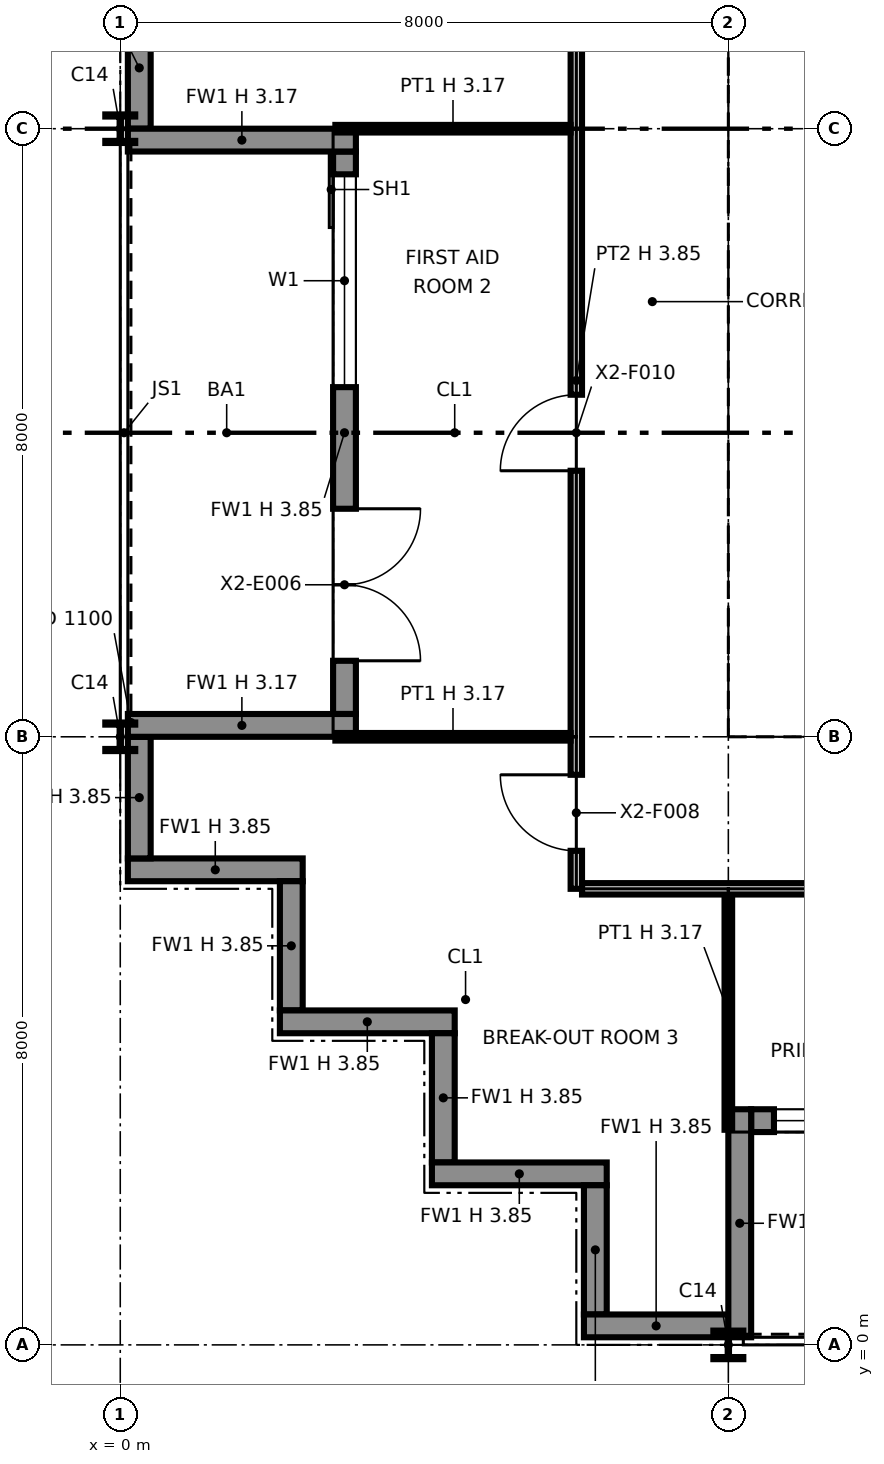
"""IFC4 building model, lengths in metres.
Left out: names, types, materials, properties, quantities, classifications, styles, units other than length and angle.
Written with IfcOpenShell. Run it as: python <this file> out.ifc"""

import sys

from ifc_helpers import new_model, si_unit, direction, frame, frame_2d, origin, origin_2d, place, context, subcontext, project, spatial, polyline, rectangle, i_section, outline, extrude, element, fill, save


model = new_model("IFC4")
c1 = context("Model", 3, precision=1e-05, world=origin(), true_north=direction((0.0, 1.0)))
c2 = subcontext(c1, "Body", "Model", "MODEL_VIEW")
j1 = project(units=[si_unit("LENGTHUNIT", "METRE"), si_unit("PLANEANGLEUNIT", "RADIAN")], contexts=[c1])
p1 = place(None, origin())
s1 = spatial("IfcSite", under=j1, at=p1, CompositionType="ELEMENT")
p2 = place(p1, origin())
s2 = spatial("IfcBuilding", under=s1, at=p2, CompositionType="ELEMENT")
p3 = place(p2, frame((0.0, 0.0, 263.0)))
s3 = spatial("IfcBuildingStorey", under=s2, at=p3, CompositionType="ELEMENT", Elevation=263.0)
for number, where, z_axis, x_axis in (
    (1, (0.0, 8.0, 0.0), (0.0, 0.0, 1.0), (1.0, 0.0, 0.0)),
    (2, (0.0, 16.0, 0.0), (0.0, 0.0, 1.0), (1.0, 0.0, 0.0)),
    (3, (8.0, 0.0, 0.0), (0.0, 0.0, 1.0), (1.0, 0.0, 0.0)),
):
    element("IfcColumn", number, at=place(p3, frame(where, z_axis=z_axis, x_axis=x_axis)), inside=s3, PredefinedType="COLUMN", context=c2, shape_type="SweptSolid", body=[
        extrude(i_section(OverallWidth=0.394, OverallDepth=0.376, WebThickness=0.017, FlangeThickness=0.028, at=origin_2d()), origin(), (0.0, 0.0, 1.0), 3.85),
    ])
for number, where, z_axis, x_axis in (
    (4, (8.0, 8.0, 0.0), (0.0, 0.0, 1.0), (1.0, 0.0, 0.0)),
    (5, (8.0, 16.0, 0.0), (0.0, 0.0, 1.0), (1.0, 0.0, 0.0)),
):
    element("IfcColumn", number, at=place(p3, frame(where, z_axis=z_axis, x_axis=x_axis)), inside=s3, PredefinedType="COLUMN", context=c2, shape_type="SweptSolid", body=[
        extrude(i_section(OverallWidth=0.371, OverallDepth=0.361, WebThickness=0.012, FlangeThickness=0.02, at=origin_2d()), origin(), (0.0, 0.0, 1.0), 3.85),
    ])
p4 = place(p3, frame((0.1, 6.25, 0.0), z_axis=(0.0, 0.0, 1.0), x_axis=(1.0, 0.0, 0.0)))
e6 = element("IfcWall", 6, at=p4, inside=s3, PredefinedType="SOLIDWALL", context=c2, shape_type="SweptSolid", body=[
    extrude(rectangle(XDim=2.3, YDim=0.3, at=frame_2d((1.15, 0.0))), origin(), (0.0, 0.0, 1.0), 3.85),
])
p5 = place(p3, frame((2.25, 6.1, 0.0), z_axis=(0.0, 0.0, 1.0), x_axis=(0.0, -1.0, 0.0)))
e7 = element("IfcWall", 7, at=p5, inside=s3, PredefinedType="SOLIDWALL", context=c2, shape_type="SweptSolid", body=[
    extrude(rectangle(XDim=1.7, YDim=0.3, at=frame_2d((0.85, 0.0))), origin(), (0.0, 0.0, 1.0), 3.85),
])
p6 = place(p3, frame((2.1, 4.25, 0.0), z_axis=(0.0, 0.0, 1.0), x_axis=(1.0, 0.0, 0.0)))
e8 = element("IfcWall", 8, at=p6, inside=s3, PredefinedType="SOLIDWALL", context=c2, shape_type="SweptSolid", body=[
    extrude(rectangle(XDim=2.3, YDim=0.3, at=frame_2d((1.15, 0.0))), origin(), (0.0, 0.0, 1.0), 3.85),
])
p7 = place(p3, frame((4.25, 4.1, 0.0), z_axis=(0.0, 0.0, 1.0), x_axis=(0.0, -1.0, 0.0)))
e9 = element("IfcWall", 9, at=p7, inside=s3, PredefinedType="SOLIDWALL", context=c2, shape_type="SweptSolid", body=[
    extrude(rectangle(XDim=1.7, YDim=0.3, at=frame_2d((0.85, 0.0))), origin(), (0.0, 0.0, 1.0), 3.85),
])
p8 = place(p3, frame((4.1, 2.25, 0.0), z_axis=(0.0, 0.0, 1.0), x_axis=(1.0, 0.0, 0.0)))
e10 = element("IfcWall", 10, at=p8, inside=s3, PredefinedType="SOLIDWALL", context=c2, shape_type="SweptSolid", body=[
    extrude(rectangle(XDim=2.3, YDim=0.3, at=frame_2d((1.15, 0.0))), origin(), (0.0, 0.0, 1.0), 3.85),
])
p9 = place(p3, frame((6.25, 2.1, 0.0), z_axis=(0.0, 0.0, 1.0), x_axis=(0.0, -1.0, 0.0)))
e11 = element("IfcWall", 11, at=p9, inside=s3, PredefinedType="SOLIDWALL", context=c2, shape_type="SweptSolid", body=[
    extrude(rectangle(XDim=1.7, YDim=0.3, at=frame_2d((0.85, 0.0))), origin(), (0.0, 0.0, 1.0), 3.85),
])
p10 = place(p3, frame((6.1, 0.25, 0.0), z_axis=(0.0, 0.0, 1.0), x_axis=(1.0, 0.0, 0.0)))
e12 = element("IfcWall", 12, at=p10, inside=s3, PredefinedType="SOLIDWALL", context=c2, shape_type="SweptSolid", body=[
    extrude(rectangle(XDim=1.9, YDim=0.3, at=frame_2d((0.95, 0.0))), origin(), (0.0, 0.0, 1.0), 3.85),
])
p11 = place(p3, frame((8.3, 2.95, 0.0), z_axis=(0.0, 0.0, 1.0), x_axis=(1.0, 0.0, 0.0)))
e13 = element("IfcWall", 13, at=p11, inside=s3, PredefinedType="SOLIDWALL", context=c2, shape_type="SweptSolid", body=[
    extrude(rectangle(XDim=7.4, YDim=0.3, at=frame_2d((3.7, 0.0))), origin(), (0.0, 0.0, 1.0), 3.85),
])
p12 = place(p11, frame((0.3, 0.0, 0.9)))
e14 = element("IfcOpeningElement", 14, at=p12, cuts=e13, PredefinedType="OPENING", context=c2, shape_type="SweptSolid", body=[
    extrude(rectangle(XDim=2.8, YDim=2.2, at=frame_2d((1.4, 1.1))), frame((0.0, 0.16, 0.0), z_axis=(0.0, -1.0, 0.0), x_axis=(1.0, 0.0, 0.0)), (0.0, 0.0, 1.0), 0.32),
])
p13 = place(p11, frame((4.7, 0.0, 0.0)))
e15 = element("IfcOpeningElement", 15, at=p13, cuts=e13, PredefinedType="OPENING", context=c2, shape_type="SweptSolid", body=[
    extrude(rectangle(XDim=2.0, YDim=2.4, at=frame_2d((1.0, 1.2))), frame((0.0, 0.16, 0.0), z_axis=(0.0, -1.0, 0.0), x_axis=(1.0, 0.0, 0.0)), (0.0, 0.0, 1.0), 0.32),
])
p14 = place(p3, frame((8.15, 0.1, 0.0), z_axis=(0.0, 0.0, 1.0), x_axis=(0.0, 1.0, 0.0)))
e16 = element("IfcWall", 16, at=p14, inside=s3, PredefinedType="SOLIDWALL", context=c2, shape_type="SweptSolid", body=[
    extrude(rectangle(XDim=3.0, YDim=0.3, at=frame_2d((1.5, 0.0))), origin(), (0.0, 0.0, 1.0), 3.171),
])
p15 = place(p3, frame((0.25, 17.6, 0.0), z_axis=(0.0, 0.0, 1.0), x_axis=(0.0, -1.0, 0.0)))
e17 = element("IfcWall", 17, at=p15, inside=s3, PredefinedType="SOLIDWALL", context=c2, shape_type="SweptSolid", body=[
    extrude(rectangle(XDim=1.6, YDim=0.3, at=frame_2d((0.8, 0.0))), origin(), (0.0, 0.0, 1.0), 3.85),
])
p16 = place(p3, frame((2.95, 15.7, 0.0), z_axis=(0.0, 0.0, 1.0), x_axis=(0.0, -1.0, 0.0)))
e18 = element("IfcWall", 18, at=p16, inside=s3, PredefinedType="SOLIDWALL", context=c2, shape_type="SweptSolid", body=[
    extrude(rectangle(XDim=7.4, YDim=0.3, at=frame_2d((3.7, 0.0))), origin(), (0.0, 0.0, 1.0), 3.85),
])
p17 = place(p16, frame((0.3, 0.0, 0.9)))
e19 = element("IfcOpeningElement", 19, at=p17, cuts=e18, PredefinedType="OPENING", context=c2, shape_type="SweptSolid", body=[
    extrude(rectangle(XDim=2.8, YDim=2.2, at=frame_2d((1.4, 1.1))), frame((0.0, 0.16, 0.0), z_axis=(0.0, -1.0, 0.0), x_axis=(1.0, 0.0, 0.0)), (0.0, 0.0, 1.0), 0.32),
])
p18 = place(p16, frame((4.7, 0.0, 0.0)))
e20 = element("IfcOpeningElement", 20, at=p18, cuts=e18, PredefinedType="OPENING", context=c2, shape_type="SweptSolid", body=[
    extrude(rectangle(XDim=2.0, YDim=2.4, at=frame_2d((1.0, 1.2))), frame((0.0, 0.16, 0.0), z_axis=(0.0, -1.0, 0.0), x_axis=(1.0, 0.0, 0.0)), (0.0, 0.0, 1.0), 0.32),
])
for number, where, z_axis, x_axis in (
    (21, (0.1, 15.85, 0.0), (0.0, 0.0, 1.0), (1.0, 0.0, 0.0)),
    (22, (0.1, 8.15, 0.0), (0.0, 0.0, 1.0), (1.0, 0.0, 0.0)),
):
    element("IfcWall", number, at=place(p3, frame(where, z_axis=z_axis, x_axis=x_axis)), inside=s3, PredefinedType="SOLIDWALL", context=c2, shape_type="SweptSolid", body=[
        extrude(rectangle(XDim=3.0, YDim=0.3, at=frame_2d((1.5, 0.0))), origin(), (0.0, 0.0, 1.0), 3.171),
    ])
p19 = place(p3, frame((0.25, 8.0, 0.0), z_axis=(0.0, 0.0, 1.0), x_axis=(0.0, -1.0, 0.0)))
e23 = element("IfcWall", 23, at=p19, inside=s3, PredefinedType="SOLIDWALL", context=c2, shape_type="SweptSolid", body=[
    extrude(rectangle(XDim=1.6, YDim=0.3, at=frame_2d((0.8, 0.0))), origin(), (0.0, 0.0, 1.0), 3.85),
])
p20 = place(p3, frame((8.65, 8.75, 0.0), z_axis=(0.0, 0.0, 1.0), x_axis=(1.0, 0.0, 0.0)))
e24 = element("IfcWall", 24, at=p20, inside=s3, PredefinedType="PARTITIONING", context=c2, shape_type="SweptSolid", body=[
    extrude(outline(polyline([(0.0, 0.0), (14.7, 0.0), (14.7, 3.85), (7.438, 3.85), (7.438, 3.308), (7.262, 3.308), (7.261, 3.85), (0.0, 3.85), (0.0, 0.0)])), frame((0.0, 0.1, 0.0), z_axis=(0.0, -1.0, 0.0), x_axis=(1.0, 0.0, 0.0)), (0.0, 0.0, 1.0), 0.2),
])
p21 = place(p20, frame((1.3, 0.0, 0.0)))
e25 = element("IfcOpeningElement", 25, at=p21, cuts=e24, PredefinedType="OPENING", context=c2, shape_type="SweptSolid", body=[
    extrude(rectangle(XDim=1.4, YDim=2.1, at=frame_2d((0.7, 1.05))), frame((0.0, 0.11, 0.0), z_axis=(0.0, -1.0, 0.0), x_axis=(1.0, 0.0, 0.0)), (0.0, 0.0, 1.0), 0.22),
])
p22 = place(p20, frame((4.6, 0.0, 0.0)))
e26 = element("IfcOpeningElement", 26, at=p22, cuts=e24, PredefinedType="OPENING", context=c2, shape_type="SweptSolid", body=[
    extrude(rectangle(XDim=1.4, YDim=2.1, at=frame_2d((0.7, 1.05))), frame((0.0, 0.11, 0.0), z_axis=(0.0, -1.0, 0.0), x_axis=(1.0, 0.0, 0.0)), (0.0, 0.0, 1.0), 0.22),
])
p23 = place(p20, frame((10.4, 0.0, 0.0)))
e27 = element("IfcOpeningElement", 27, at=p23, cuts=e24, PredefinedType="OPENING", context=c2, shape_type="SweptSolid", body=[
    extrude(rectangle(XDim=1.2, YDim=2.1, at=frame_2d((0.6, 1.05))), frame((0.0, 0.11, 0.0), z_axis=(0.0, -1.0, 0.0), x_axis=(1.0, 0.0, 0.0)), (0.0, 0.0, 1.0), 0.22),
])
p24 = place(p3, frame((8.75, 8.85, 0.0), z_axis=(0.0, 0.0, 1.0), x_axis=(0.0, 1.0, 0.0)))
e28 = element("IfcWall", 28, at=p24, inside=s3, PredefinedType="PARTITIONING", context=c2, shape_type="SweptSolid", body=[
    extrude(outline(polyline([(0.0, 0.0), (14.3, 0.0), (14.3, 3.85), (10.225, 3.85), (10.224, 3.44), (10.076, 3.44), (10.075, 3.85), (7.239, 3.85), (7.238, 3.308), (7.062, 3.308), (7.062, 3.85), (0.0, 3.85), (0.0, 0.0)])), frame((0.0, 0.1, 0.0), z_axis=(0.0, -1.0, 0.0), x_axis=(1.0, 0.0, 0.0)), (0.0, 0.0, 1.0), 0.2),
])
p25 = place(p24, frame((8.3, 0.0, 0.0)))
e29 = element("IfcOpeningElement", 29, at=p25, cuts=e28, PredefinedType="OPENING", context=c2, shape_type="SweptSolid", body=[
    extrude(rectangle(XDim=1.8, YDim=2.1, at=frame_2d((0.9, 1.05))), frame((0.0, 0.11, 0.0), z_axis=(0.0, -1.0, 0.0), x_axis=(1.0, 0.0, 0.0)), (0.0, 0.0, 1.0), 0.22),
])
p26 = place(p3, frame((8.85, 16.0, 0.0), z_axis=(0.0, 0.0, 1.0), x_axis=(1.0, 0.0, 0.0)))
e30 = element("IfcWall", 30, at=p26, inside=s3, PredefinedType="PARTITIONING", context=c2, shape_type="SweptSolid", body=[
    extrude(rectangle(XDim=6.954, YDim=0.6, at=frame_2d((3.477, 0.0))), origin(), (0.0, 0.0, 1.0), 3.308),
])
p27 = place(p3, frame((8.0, 2.83, 0.0), z_axis=(0.0, 0.0, 1.0), x_axis=(0.0, 1.0, 0.0)))
e31 = element("IfcWall", 31, at=p27, inside=s3, PredefinedType="PARTITIONING", context=c2, shape_type="SweptSolid", body=[
    extrude(rectangle(XDim=3.095, YDim=0.1, at=frame_2d((1.547, 0.0))), origin(), (0.0, 0.0, 1.0), 3.172),
])
p28 = place(p3, frame((6.075, 6.0, 0.0), z_axis=(0.0, 0.0, 1.0), x_axis=(1.0, 0.0, 0.0)))
e32 = element("IfcWall", 32, at=p28, inside=s3, PredefinedType="PARTITIONING", context=c2, shape_type="SweptSolid", body=[
    extrude(rectangle(XDim=35.85, YDim=0.15, at=frame_2d((17.925, 0.0))), origin(), (0.0, 0.0, 1.0), 3.85),
])
p29 = place(p28, frame((14.425, 0.0, 0.0), z_axis=(0.0, 0.0, 1.0), x_axis=(-1.0, 0.0, 0.0)))
e33 = element("IfcOpeningElement", 33, at=p29, cuts=e32, PredefinedType="OPENING", context=c2, shape_type="SweptSolid", body=[
    extrude(rectangle(XDim=1.0, YDim=2.1, at=frame_2d((0.5, 1.05))), frame((0.0, 0.085, 0.0), z_axis=(0.0, -1.0, 0.0), x_axis=(1.0, 0.0, 0.0)), (0.0, 0.0, 1.0), 0.17),
])
p30 = place(p28, frame((30.425, 0.0, 0.0), z_axis=(0.0, 0.0, 1.0), x_axis=(-1.0, 0.0, 0.0)))
e34 = element("IfcOpeningElement", 34, at=p30, cuts=e32, PredefinedType="OPENING", context=c2, shape_type="SweptSolid", body=[
    extrude(rectangle(XDim=1.0, YDim=2.1, at=frame_2d((0.5, 1.05))), frame((0.0, 0.085, 0.0), z_axis=(0.0, -1.0, 0.0), x_axis=(1.0, 0.0, 0.0)), (0.0, 0.0, 1.0), 0.17),
])
p31 = place(p28, frame((4.425, 0.0, 0.0), z_axis=(0.0, 0.0, 1.0), x_axis=(-1.0, 0.0, 0.0)))
e35 = element("IfcOpeningElement", 35, at=p31, cuts=e32, PredefinedType="OPENING", context=c2, shape_type="SweptSolid", body=[
    extrude(rectangle(XDim=1.0, YDim=2.1, at=frame_2d((0.5, 1.05))), frame((0.0, 0.085, 0.0), z_axis=(0.0, -1.0, 0.0), x_axis=(1.0, 0.0, 0.0)), (0.0, 0.0, 1.0), 0.17),
])
p32 = place(p28, frame((8.425, 0.0, 0.0), z_axis=(0.0, 0.0, 1.0), x_axis=(-1.0, 0.0, 0.0)))
e36 = element("IfcOpeningElement", 36, at=p32, cuts=e32, PredefinedType="OPENING", context=c2, shape_type="SweptSolid", body=[
    extrude(rectangle(XDim=1.0, YDim=2.1, at=frame_2d((0.5, 1.05))), frame((0.0, 0.085, 0.0), z_axis=(0.0, -1.0, 0.0), x_axis=(1.0, 0.0, 0.0)), (0.0, 0.0, 1.0), 0.17),
])
p33 = place(p28, frame((23.425, 0.0, 0.0), z_axis=(0.0, 0.0, 1.0), x_axis=(-1.0, 0.0, 0.0)))
e37 = element("IfcOpeningElement", 37, at=p33, cuts=e32, PredefinedType="OPENING", context=c2, shape_type="SweptSolid", body=[
    extrude(rectangle(XDim=1.0, YDim=2.1, at=frame_2d((0.5, 1.05))), frame((0.0, 0.085, 0.0), z_axis=(0.0, -1.0, 0.0), x_axis=(1.0, 0.0, 0.0)), (0.0, 0.0, 1.0), 0.17),
])
p34 = place(p28, frame((35.425, 0.0, 0.0), z_axis=(0.0, 0.0, 1.0), x_axis=(-1.0, 0.0, 0.0)))
e38 = element("IfcOpeningElement", 38, at=p34, cuts=e32, PredefinedType="OPENING", context=c2, shape_type="SweptSolid", body=[
    extrude(rectangle(XDim=1.0, YDim=2.1, at=frame_2d((0.5, 1.05))), frame((0.0, 0.085, 0.0), z_axis=(0.0, -1.0, 0.0), x_axis=(1.0, 0.0, 0.0)), (0.0, 0.0, 1.0), 0.17),
])
p35 = place(p3, frame((6.0, 6.0, 0.0), z_axis=(0.0, 0.0, 1.0), x_axis=(0.0, 1.0, 0.0)))
e39 = element("IfcWall", 39, at=p35, inside=s3, PredefinedType="PARTITIONING", context=c2, shape_type="SweptSolid", body=[
    extrude(outline(polyline([(0.0, 0.0), (13.375, 0.0), (13.375, 3.85), (10.3, 3.85), (10.298, 3.172), (9.702, 3.172), (9.7, 3.85), (6.3, 3.85), (6.298, 3.172), (5.702, 3.172), (5.7, 3.85), (2.3, 3.85), (2.298, 3.172), (1.702, 3.172), (1.7, 3.85), (0.0, 3.85), (0.0, 0.0)])), frame((0.0, 0.075, 0.0), z_axis=(0.0, -1.0, 0.0), x_axis=(1.0, 0.0, 0.0)), (0.0, 0.0, 1.0), 0.15),
])
p36 = place(p35, frame((0.5, 0.0, 0.0)))
e40 = element("IfcOpeningElement", 40, at=p36, cuts=e39, PredefinedType="OPENING", context=c2, shape_type="SweptSolid", body=[
    extrude(rectangle(XDim=1.0, YDim=2.1, at=frame_2d((0.5, 1.05))), frame((0.0, 0.085, 0.0), z_axis=(0.0, -1.0, 0.0), x_axis=(1.0, 0.0, 0.0)), (0.0, 0.0, 1.0), 0.17),
])
p37 = place(p35, frame((5.5, 0.0, 0.0)))
e41 = element("IfcOpeningElement", 41, at=p37, cuts=e39, PredefinedType="OPENING", context=c2, shape_type="SweptSolid", body=[
    extrude(rectangle(XDim=1.0, YDim=2.1, at=frame_2d((0.5, 1.05))), frame((0.0, 0.085, 0.0), z_axis=(0.0, -1.0, 0.0), x_axis=(1.0, 0.0, 0.0)), (0.0, 0.0, 1.0), 0.17),
])
p38 = place(p35, frame((11.225, 0.0, 0.0)))
e42 = element("IfcOpeningElement", 42, at=p38, cuts=e39, PredefinedType="OPENING", context=c2, shape_type="SweptSolid", body=[
    extrude(rectangle(XDim=1.0, YDim=2.1, at=frame_2d((0.5, 1.05))), frame((0.0, 0.085, 0.0), z_axis=(0.0, -1.0, 0.0), x_axis=(1.0, 0.0, 0.0)), (0.0, 0.0, 1.0), 0.17),
])
for number, where, z_axis, x_axis in (
    (43, (2.83, 8.0, 0.0), (0.0, 0.0, 1.0), (1.0, 0.0, 0.0)),
    (44, (2.83, 16.0, 0.0), (0.0, 0.0, 1.0), (1.0, 0.0, 0.0)),
):
    element("IfcWall", number, at=place(p3, frame(where, z_axis=z_axis, x_axis=x_axis)), inside=s3, PredefinedType="PARTITIONING", context=c2, shape_type="SweptSolid", body=[
        extrude(rectangle(XDim=3.095, YDim=0.1, at=frame_2d((1.547, 0.0))), origin(), (0.0, 0.0, 1.0), 3.172),
    ])
p39 = place(p12, origin())
e45 = element("IfcWindow", 45, at=p39, inside=s3, PartitioningType="SINGLE_PANEL", PredefinedType="WINDOW", context=c2, shape_type="SweptSolid", body=[
    extrude(rectangle(XDim=2.8, YDim=2.2, at=frame_2d((1.4, 1.1))), frame((0.0, 0.03, 0.0), z_axis=(0.0, -1.0, 0.0), x_axis=(1.0, 0.0, 0.0)), (0.0, 0.0, 1.0), 0.06),
])
fill(e14, e45)
p40 = place(p17, origin())
e46 = element("IfcWindow", 46, at=p40, inside=s3, PartitioningType="SINGLE_PANEL", PredefinedType="WINDOW", context=c2, shape_type="SweptSolid", body=[
    extrude(rectangle(XDim=2.8, YDim=2.2, at=frame_2d((1.4, 1.1))), frame((0.0, 0.03, 0.0), z_axis=(0.0, -1.0, 0.0), x_axis=(1.0, 0.0, 0.0)), (0.0, 0.0, 1.0), 0.06),
])
fill(e19, e46)
p41 = place(p18, origin())
e47 = element("IfcDoor", 47, at=p41, inside=s3, OperationType="DOUBLE_DOOR_SINGLE_SWING", PredefinedType="DOOR", context=c2, shape_type="SweptSolid", body=[
    extrude(rectangle(XDim=2.0, YDim=2.4, at=frame_2d((1.0, 1.2))), frame((0.0, 0.025, 0.0), z_axis=(0.0, -1.0, 0.0), x_axis=(1.0, 0.0, 0.0)), (0.0, 0.0, 1.0), 0.05),
])
fill(e20, e47)
p42 = place(p36, origin())
e48 = element("IfcDoor", 48, at=p42, inside=s3, OperationType="SINGLE_SWING_RIGHT", PredefinedType="DOOR", context=c2, shape_type="SweptSolid", body=[
    extrude(rectangle(XDim=1.0, YDim=2.1, at=frame_2d((0.5, 1.05))), frame((0.0, 0.025, 0.0), z_axis=(0.0, -1.0, 0.0), x_axis=(1.0, 0.0, 0.0)), (0.0, 0.0, 1.0), 0.05),
])
fill(e40, e48)
p43 = place(p37, origin())
e49 = element("IfcDoor", 49, at=p43, inside=s3, OperationType="SINGLE_SWING_LEFT", PredefinedType="DOOR", context=c2, shape_type="SweptSolid", body=[
    extrude(rectangle(XDim=1.0, YDim=2.1, at=frame_2d((0.5, 1.05))), frame((0.0, 0.025, 0.0), z_axis=(0.0, -1.0, 0.0), x_axis=(1.0, 0.0, 0.0)), (0.0, 0.0, 1.0), 0.05),
])
fill(e41, e49)
save(model, sys.argv[1])
